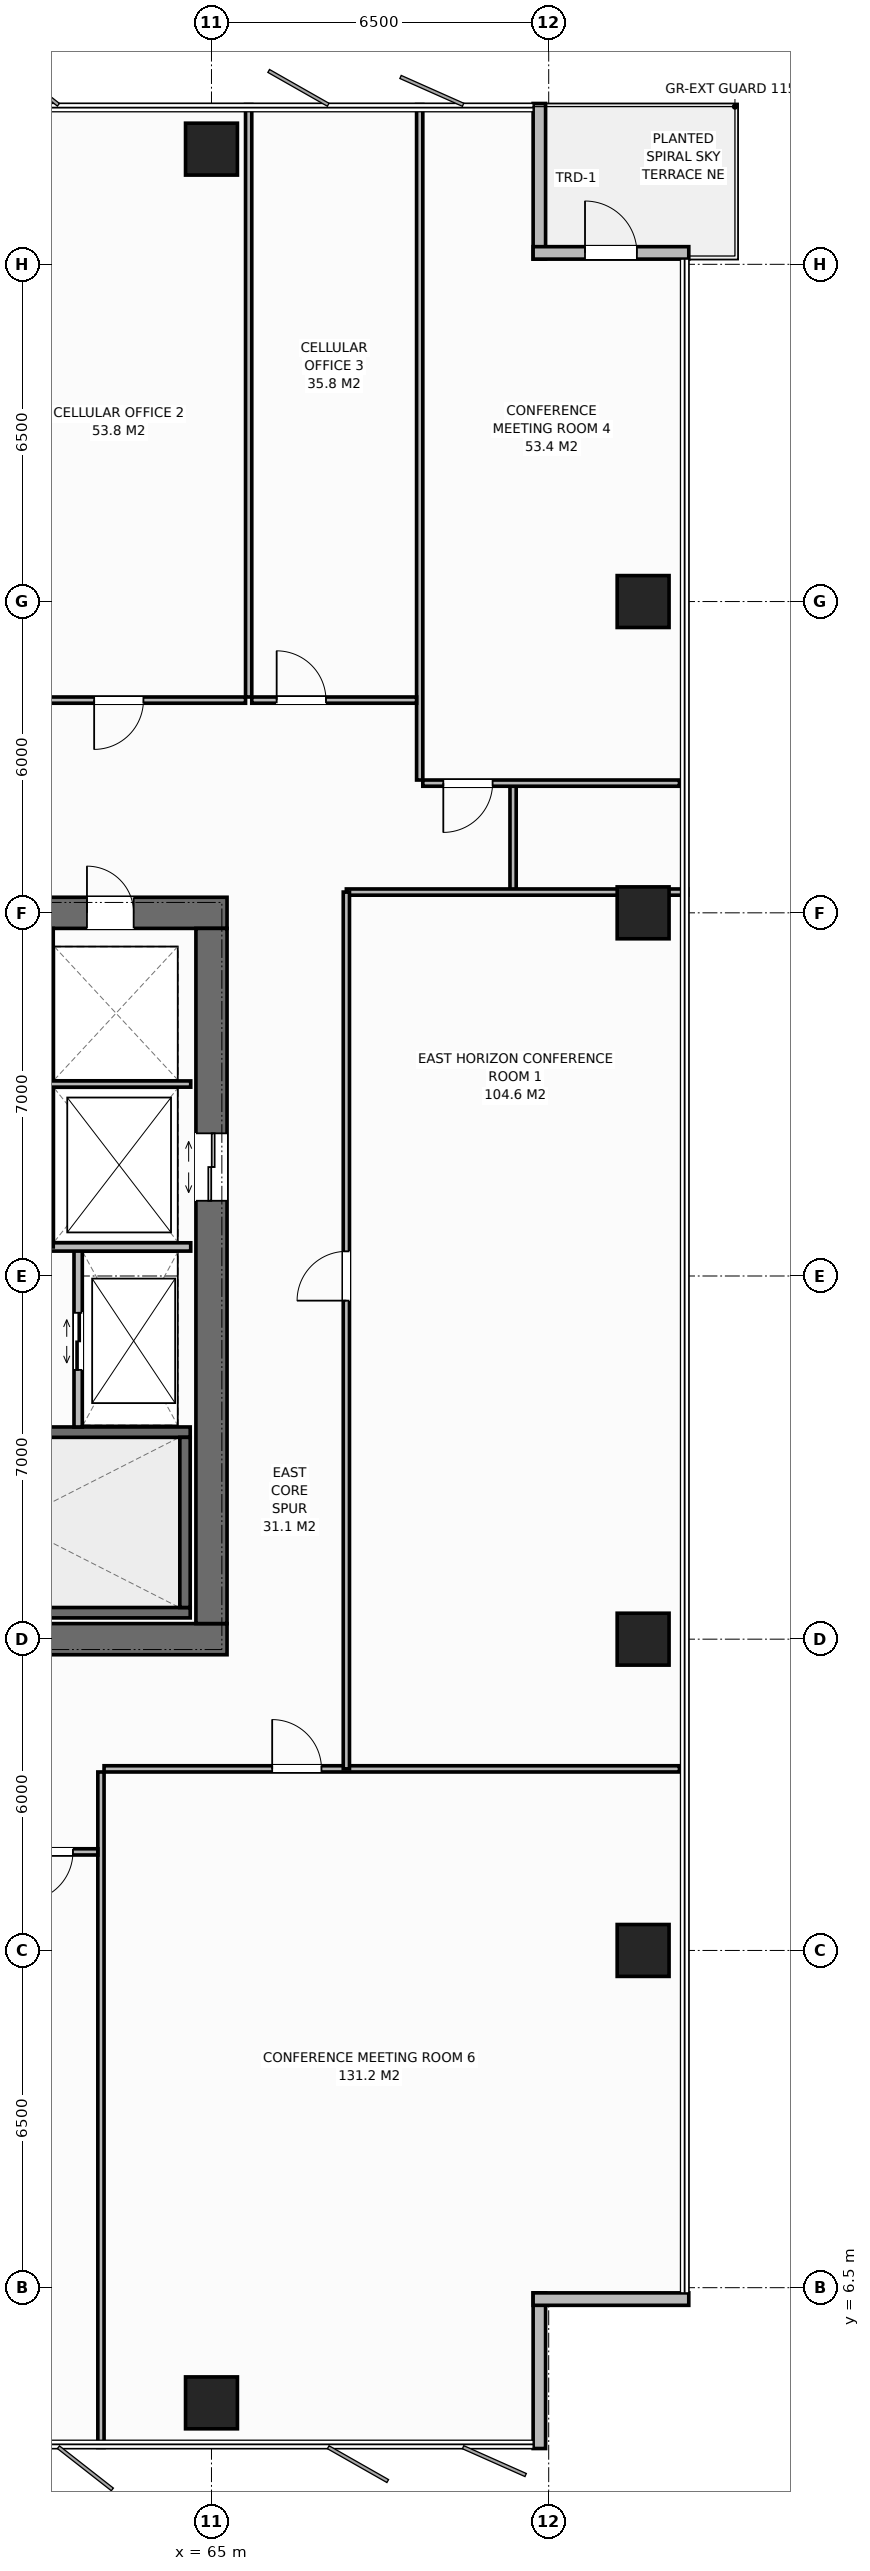
"""IFC4 building model, lengths in metres.
Left out: names, types, materials, properties, quantities, classifications, styles, units other than length and angle.
Written with IfcOpenShell. Run it as: python <this file> out.ifc"""

import sys

from ifc_helpers import new_model, si_unit, direction, frame, frame_2d, origin, origin_2d, place, context, subcontext, project, spatial, rectangle, extrude, element, fill, save


model = new_model("IFC4")
c1 = context("Model", 3, precision=1e-05, world=origin(), true_north=direction((0.0, 1.0)))
c2 = subcontext(c1, "Body", "Model", "MODEL_VIEW")
j1 = project(units=[si_unit("LENGTHUNIT", "METRE"), si_unit("PLANEANGLEUNIT", "RADIAN")], contexts=[c1])
p1 = place(None, origin())
s1 = spatial("IfcSite", under=j1, at=p1, CompositionType="ELEMENT")
p2 = place(p1, origin())
s2 = spatial("IfcBuilding", under=s1, at=p2, CompositionType="ELEMENT")
p3 = place(p2, frame((0.0, 0.0, 193.6)))
s3 = spatial("IfcBuildingStorey", under=s2, at=p3, CompositionType="ELEMENT", Elevation=193.6)
p4 = place(p3, frame((51.7, 19.0, 0.0), z_axis=(0.0, 0.0, 1.0), x_axis=(1.0, 0.0, 0.0)))
e1 = element("IfcWall", 1, at=p4, inside=s3, PredefinedType="SHEAR", context=c2, shape_type="SweptSolid", body=[
    extrude(rectangle(XDim=13.6, YDim=0.6, at=frame_2d((6.8, 0.0))), origin(), (0.0, 0.0, 1.0), 3.8),
])
p5 = place(p4, frame((3.02, 0.0, 0.0)))
e2 = element("IfcOpeningElement", 2, at=p5, cuts=e1, PredefinedType="OPENING", context=c2, shape_type="SweptSolid", body=[
    extrude(rectangle(XDim=1.4, YDim=2.2, at=frame_2d((0.7, 1.1))), frame((0.0, 0.31, 0.0), z_axis=(0.0, -1.0, 0.0), x_axis=(1.0, 0.0, 0.0)), (0.0, 0.0, 1.0), 0.62),
])
p6 = place(p3, frame((51.7, 33.0, 0.0), z_axis=(0.0, 0.0, 1.0), x_axis=(1.0, 0.0, 0.0)))
e3 = element("IfcWall", 3, at=p6, inside=s3, PredefinedType="SHEAR", context=c2, shape_type="SweptSolid", body=[
    extrude(rectangle(XDim=13.6, YDim=0.6, at=frame_2d((6.8, 0.0))), origin(), (0.0, 0.0, 1.0), 3.8),
])
p7 = place(p6, frame((3.02, 0.0, 0.0)))
e4 = element("IfcOpeningElement", 4, at=p7, cuts=e3, PredefinedType="OPENING", context=c2, shape_type="SweptSolid", body=[
    extrude(rectangle(XDim=1.4, YDim=2.2, at=frame_2d((0.7, 1.1))), frame((0.0, 0.31, 0.0), z_axis=(0.0, -1.0, 0.0), x_axis=(1.0, 0.0, 0.0)), (0.0, 0.0, 1.0), 0.62),
])
p8 = place(p6, frame((10.9, 0.0, 0.0)))
e5 = element("IfcOpeningElement", 5, at=p8, cuts=e3, PredefinedType="OPENING", context=c2, shape_type="SweptSolid", body=[
    extrude(rectangle(XDim=0.9, YDim=2.15, at=frame_2d((0.45, 1.075))), frame((0.0, 0.31, 0.0), z_axis=(0.0, -1.0, 0.0), x_axis=(1.0, 0.0, 0.0)), (0.0, 0.0, 1.0), 0.62),
])
p9 = place(p6, frame((6.3, 0.0, 0.0)))
e6 = element("IfcOpeningElement", 6, at=p9, cuts=e3, PredefinedType="OPENING", context=c2, shape_type="SweptSolid", body=[
    extrude(rectangle(XDim=0.95, YDim=2.15, at=frame_2d((0.475, 1.075))), frame((0.0, 0.31, 0.0), z_axis=(0.0, -1.0, 0.0), x_axis=(1.0, 0.0, 0.0)), (0.0, 0.0, 1.0), 0.62),
])
p10 = place(p6, frame((8.75, 0.0, 0.0)))
e7 = element("IfcOpeningElement", 7, at=p10, cuts=e3, PredefinedType="OPENING", context=c2, shape_type="SweptSolid", body=[
    extrude(rectangle(XDim=0.9, YDim=2.15, at=frame_2d((0.45, 1.075))), frame((0.0, 0.31, 0.0), z_axis=(0.0, -1.0, 0.0), x_axis=(1.0, 0.0, 0.0)), (0.0, 0.0, 1.0), 0.62),
])
p11 = place(p3, frame((65.0, 19.3, 0.0), z_axis=(0.0, 0.0, 1.0), x_axis=(0.0, 1.0, 0.0)))
e8 = element("IfcWall", 8, at=p11, inside=s3, PredefinedType="SHEAR", context=c2, shape_type="SweptSolid", body=[
    extrude(rectangle(XDim=13.4, YDim=0.6, at=frame_2d((6.7, 0.0))), origin(), (0.0, 0.0, 1.0), 3.8),
])
p12 = place(p11, frame((8.15, 0.0, 0.0)))
e9 = element("IfcOpeningElement", 9, at=p12, cuts=e8, PredefinedType="OPENING", context=c2, shape_type="SweptSolid", body=[
    extrude(rectangle(XDim=1.3, YDim=2.2, at=frame_2d((0.65, 1.1))), frame((0.0, 0.31, 0.0), z_axis=(0.0, -1.0, 0.0), x_axis=(1.0, 0.0, 0.0)), (0.0, 0.0, 1.0), 0.62),
])
p13 = place(p3, frame((56.16, 19.51, 0.0), z_axis=(0.0, 0.0, 1.0), x_axis=(1.0, 0.0, 0.0)))
e10 = element("IfcWall", 10, at=p13, inside=s3, PredefinedType="SHEAR", context=c2, shape_type="SweptSolid", body=[
    extrude(rectangle(XDim=8.43, YDim=0.2, at=frame_2d((4.215, 0.0))), origin(), (0.0, 0.0, 1.0), 3.8),
])
p14 = place(p3, frame((56.16, 22.99, 0.0), z_axis=(0.0, 0.0, 1.0), x_axis=(1.0, 0.0, 0.0)))
e11 = element("IfcWall", 11, at=p14, inside=s3, PredefinedType="SHEAR", context=c2, shape_type="SweptSolid", body=[
    extrude(rectangle(XDim=8.43, YDim=0.2, at=frame_2d((4.215, 0.0))), origin(), (0.0, 0.0, 1.0), 3.8),
])
p15 = place(p14, frame((0.45, 0.0, 0.0)))
e12 = element("IfcOpeningElement", 12, at=p15, cuts=e11, PredefinedType="OPENING", context=c2, shape_type="SweptSolid", body=[
    extrude(rectangle(XDim=1.0, YDim=2.15, at=frame_2d((0.5, 1.075))), frame((0.0, 0.11, 0.0), z_axis=(0.0, -1.0, 0.0), x_axis=(1.0, 0.0, 0.0)), (0.0, 0.0, 1.0), 0.22),
])
p16 = place(p3, frame((64.49, 19.61, 0.0), z_axis=(0.0, 0.0, 1.0), x_axis=(0.0, 1.0, 0.0)))
e13 = element("IfcWall", 13, at=p16, inside=s3, PredefinedType="SHEAR", context=c2, shape_type="SweptSolid", body=[
    extrude(rectangle(XDim=3.28, YDim=0.2, at=frame_2d((1.64, 0.0))), origin(), (0.0, 0.0, 1.0), 3.8),
])
for number, where, z_axis, x_axis in (
    (14, (65.0, 4.28, 0.0), (0.0, 0.0, 1.0), (1.0, 0.0, 0.0)),
    (15, (65.0, 47.72, 0.0), (0.0, 0.0, 1.0), (1.0, 0.0, 0.0)),
    (16, (73.32, 13.0, 0.0), (0.0, 0.0, 1.0), (1.0, 0.0, 0.0)),
    (17, (73.32, 19.0, 0.0), (0.0, 0.0, 1.0), (1.0, 0.0, 0.0)),
    (18, (73.32, 33.0, 0.0), (0.0, 0.0, 1.0), (1.0, 0.0, 0.0)),
    (19, (73.32, 39.0, 0.0), (0.0, 0.0, 1.0), (1.0, 0.0, 0.0)),
):
    element("IfcColumn", number, at=place(p3, frame(where, z_axis=z_axis, x_axis=x_axis)), inside=s3, PredefinedType="COLUMN", context=c2, shape_type="SweptSolid", body=[
        extrude(rectangle(XDim=1.0, YDim=1.0, at=origin_2d()), origin(), (0.0, 0.0, 1.0), 3.8),
    ])
p17 = place(p3, frame((71.32, 48.6, 0.0), z_axis=(0.0, 0.0, 1.0), x_axis=(0.0, -1.0, 0.0)))
e20 = element("IfcWall", 20, at=p17, inside=s3, PredefinedType="STANDARD", context=c2, shape_type="SweptSolid", body=[
    extrude(rectangle(XDim=3.0, YDim=0.24, at=frame_2d((1.5, 0.0))), origin(), (0.0, 0.0, 1.0), 3.52),
])
p18 = place(p3, frame((71.2, 45.72, 0.0), z_axis=(0.0, 0.0, 1.0), x_axis=(1.0, 0.0, 0.0)))
e21 = element("IfcWall", 21, at=p18, inside=s3, PredefinedType="STANDARD", context=c2, shape_type="SweptSolid", body=[
    extrude(rectangle(XDim=3.0, YDim=0.24, at=frame_2d((1.5, 0.0))), origin(), (0.0, 0.0, 1.0), 3.52),
])
p19 = place(p18, frame((1.0, 0.0, 0.0)))
e22 = element("IfcOpeningElement", 22, at=p19, cuts=e21, PredefinedType="OPENING", context=c2, shape_type="SweptSolid", body=[
    extrude(rectangle(XDim=1.0, YDim=2.2, at=frame_2d((0.5, 1.1))), frame((0.0, 0.13, 0.0), z_axis=(0.0, -1.0, 0.0), x_axis=(1.0, 0.0, 0.0)), (0.0, 0.0, 1.0), 0.26),
])
for number, where, z_axis, x_axis in (
    (23, (71.32, 6.4, 0.0), (0.0, 0.0, 1.0), (0.0, -1.0, 0.0)),
    (24, (74.2, 6.28, 0.0), (0.0, 0.0, 1.0), (-1.0, 0.0, 0.0)),
):
    element("IfcWall", number, at=place(p3, frame(where, z_axis=z_axis, x_axis=x_axis)), inside=s3, PredefinedType="STANDARD", context=c2, shape_type="SweptSolid", body=[
        extrude(rectangle(XDim=3.0, YDim=0.24, at=frame_2d((1.5, 0.0))), origin(), (0.0, 0.0, 1.0), 3.52),
    ])
p20 = place(p3, frame((62.43, 23.09, 0.0), z_axis=(0.0, 0.0, 1.0), x_axis=(0.0, 1.0, 0.0)))
e25 = element("IfcWall", 25, at=p20, inside=s3, PredefinedType="STANDARD", context=c2, shape_type="SweptSolid", body=[
    extrude(rectangle(XDim=3.47, YDim=0.16, at=frame_2d((1.735, 0.0))), origin(), (0.0, 0.0, 1.0), 3.52),
])
p21 = place(p20, frame((1.1, 0.0, 0.0)))
e26 = element("IfcOpeningElement", 26, at=p21, cuts=e25, PredefinedType="OPENING", context=c2, shape_type="SweptSolid", body=[
    extrude(rectangle(XDim=1.1, YDim=2.2, at=frame_2d((0.55, 1.1))), frame((0.0, 0.09, 0.0), z_axis=(0.0, -1.0, 0.0), x_axis=(1.0, 0.0, 0.0)), (0.0, 0.0, 1.0), 0.18),
])
p22 = place(p3, frame((56.26, 26.56, 0.0), z_axis=(0.0, 0.0, 1.0), x_axis=(1.0, 0.0, 0.0)))
e27 = element("IfcWall", 27, at=p22, inside=s3, PredefinedType="STANDARD", context=c2, shape_type="SweptSolid", body=[
    extrude(rectangle(XDim=8.34, YDim=0.16, at=frame_2d((4.17, 0.0))), origin(), (0.0, 0.0, 1.0), 3.52),
])
p23 = place(p3, frame((61.87, 26.56, 0.0), z_axis=(0.0, 0.0, 1.0), x_axis=(0.0, 1.0, 0.0)))
e28 = element("IfcWall", 28, at=p23, inside=s3, PredefinedType="STANDARD", context=c2, shape_type="SweptSolid", body=[
    extrude(rectangle(XDim=6.14, YDim=0.16, at=frame_2d((3.07, 0.0))), origin(), (0.0, 0.0, 1.0), 3.52),
])
p24 = place(p3, frame((61.87, 29.7, 0.0), z_axis=(0.0, 0.0, 1.0), x_axis=(1.0, 0.0, 0.0)))
e29 = element("IfcWall", 29, at=p24, inside=s3, PredefinedType="PARTITIONING", context=c2, shape_type="SweptSolid", body=[
    extrude(rectangle(XDim=2.73, YDim=0.12, at=frame_2d((1.365, 0.0))), origin(), (0.0, 0.0, 1.0), 3.52),
])
p25 = place(p3, frame((70.813, 33.4, 0.0), z_axis=(0.0, 0.0, 1.0), x_axis=(0.0, 1.0, 0.0)))
e30 = element("IfcWall", 30, at=p25, inside=s3, PredefinedType="PARTITIONING", context=c2, shape_type="SweptSolid", body=[
    extrude(rectangle(XDim=2.1, YDim=0.12, at=frame_2d((1.05, 0.0))), origin(), (0.0, 0.0, 1.0), 3.52),
])
p26 = place(p3, frame((65.717, 37.16, 0.0), z_axis=(0.0, 0.0, 1.0), x_axis=(0.0, 1.0, 0.0)))
e31 = element("IfcWall", 31, at=p26, inside=s3, PredefinedType="PARTITIONING", context=c2, shape_type="SweptSolid", body=[
    extrude(rectangle(XDim=11.42, YDim=0.12, at=frame_2d((5.71, 0.0))), origin(), (0.0, 0.0, 1.0), 3.52),
])
p27 = place(p3, frame((60.77, 37.1, 0.0), z_axis=(0.0, 0.0, 1.0), x_axis=(1.0, 0.0, 0.0)))
e32 = element("IfcWall", 32, at=p27, inside=s3, PredefinedType="PARTITIONING", context=c2, shape_type="SweptSolid", body=[
    extrude(rectangle(XDim=4.886, YDim=0.12, at=frame_2d((2.443, 0.0))), origin(), (0.0, 0.0, 1.0), 3.52),
])
p28 = place(p27, frame((1.968, 0.0, 0.0)))
e33 = element("IfcOpeningElement", 33, at=p28, cuts=e32, PredefinedType="OPENING", context=c2, shape_type="SweptSolid", body=[
    extrude(rectangle(XDim=0.95, YDim=2.15, at=frame_2d((0.475, 1.075))), frame((0.0, 0.07, 0.0), z_axis=(0.0, -1.0, 0.0), x_axis=(1.0, 0.0, 0.0)), (0.0, 0.0, 1.0), 0.14),
])
p29 = place(p3, frame((69.013, 35.56, 0.0), z_axis=(0.0, 0.0, 1.0), x_axis=(0.0, 1.0, 0.0)))
e34 = element("IfcWall", 34, at=p29, inside=s3, PredefinedType="PARTITIONING", context=c2, shape_type="SweptSolid", body=[
    extrude(rectangle(XDim=13.02, YDim=0.12, at=frame_2d((6.51, 0.0))), origin(), (0.0, 0.0, 1.0), 3.52),
])
p30 = place(p3, frame((65.777, 37.1, 0.0), z_axis=(0.0, 0.0, 1.0), x_axis=(1.0, 0.0, 0.0)))
e35 = element("IfcWall", 35, at=p30, inside=s3, PredefinedType="PARTITIONING", context=c2, shape_type="SweptSolid", body=[
    extrude(rectangle(XDim=3.177, YDim=0.12, at=frame_2d((1.588, 0.0))), origin(), (0.0, 0.0, 1.0), 3.52),
])
p31 = place(p30, frame((0.48, 0.0, 0.0)))
e36 = element("IfcOpeningElement", 36, at=p31, cuts=e35, PredefinedType="OPENING", context=c2, shape_type="SweptSolid", body=[
    extrude(rectangle(XDim=0.95, YDim=2.15, at=frame_2d((0.475, 1.075))), frame((0.0, 0.07, 0.0), z_axis=(0.0, -1.0, 0.0), x_axis=(1.0, 0.0, 0.0)), (0.0, 0.0, 1.0), 0.14),
])
p32 = place(p3, frame((69.073, 35.5, 0.0), z_axis=(0.0, 0.0, 1.0), x_axis=(1.0, 0.0, 0.0)))
e37 = element("IfcWall", 37, at=p32, inside=s3, PredefinedType="PARTITIONING", context=c2, shape_type="SweptSolid", body=[
    extrude(rectangle(XDim=4.947, YDim=0.12, at=frame_2d((2.473, 0.0))), origin(), (0.0, 0.0, 1.0), 3.52),
])
p33 = place(p32, frame((0.395, 0.0, 0.0)))
e38 = element("IfcOpeningElement", 38, at=p33, cuts=e37, PredefinedType="OPENING", context=c2, shape_type="SweptSolid", body=[
    extrude(rectangle(XDim=0.95, YDim=2.15, at=frame_2d((0.475, 1.075))), frame((0.0, 0.07, 0.0), z_axis=(0.0, -1.0, 0.0), x_axis=(1.0, 0.0, 0.0)), (0.0, 0.0, 1.0), 0.14),
])
p34 = place(p3, frame((62.87, 3.42, 0.0), z_axis=(0.0, 0.0, 1.0), x_axis=(0.0, 1.0, 0.0)))
e39 = element("IfcWall", 39, at=p34, inside=s3, PredefinedType="PARTITIONING", context=c2, shape_type="SweptSolid", body=[
    extrude(rectangle(XDim=13.02, YDim=0.12, at=frame_2d((6.51, 0.0))), origin(), (0.0, 0.0, 1.0), 3.52),
])
p35 = place(p3, frame((56.255, 14.9, 0.0), z_axis=(0.0, 0.0, 1.0), x_axis=(1.0, 0.0, 0.0)))
e40 = element("IfcWall", 40, at=p35, inside=s3, PredefinedType="PARTITIONING", context=c2, shape_type="SweptSolid", body=[
    extrude(rectangle(XDim=6.555, YDim=0.12, at=frame_2d((3.277, 0.0))), origin(), (0.0, 0.0, 1.0), 3.52),
])
p36 = place(p35, frame((5.125, 0.0, 0.0)))
e41 = element("IfcOpeningElement", 41, at=p36, cuts=e40, PredefinedType="OPENING", context=c2, shape_type="SweptSolid", body=[
    extrude(rectangle(XDim=0.95, YDim=2.15, at=frame_2d((0.475, 1.075))), frame((0.0, 0.07, 0.0), z_axis=(0.0, -1.0, 0.0), x_axis=(1.0, 0.0, 0.0)), (0.0, 0.0, 1.0), 0.14),
])
p37 = place(p3, frame((62.93, 16.5, 0.0), z_axis=(0.0, 0.0, 1.0), x_axis=(1.0, 0.0, 0.0)))
e42 = element("IfcWall", 42, at=p37, inside=s3, PredefinedType="PARTITIONING", context=c2, shape_type="SweptSolid", body=[
    extrude(rectangle(XDim=11.09, YDim=0.12, at=frame_2d((5.545, 0.0))), origin(), (0.0, 0.0, 1.0), 3.52),
])
p38 = place(p37, frame((3.24, 0.0, 0.0)))
e43 = element("IfcOpeningElement", 43, at=p38, cuts=e42, PredefinedType="OPENING", context=c2, shape_type="SweptSolid", body=[
    extrude(rectangle(XDim=0.95, YDim=2.15, at=frame_2d((0.475, 1.075))), frame((0.0, 0.07, 0.0), z_axis=(0.0, -1.0, 0.0), x_axis=(1.0, 0.0, 0.0)), (0.0, 0.0, 1.0), 0.14),
])
p39 = place(p3, frame((67.6, 33.4, 0.0), z_axis=(0.0, 0.0, 1.0), x_axis=(1.0, 0.0, 0.0)))
e44 = element("IfcWall", 44, at=p39, inside=s3, PredefinedType="PARTITIONING", context=c2, shape_type="SweptSolid", body=[
    extrude(rectangle(XDim=6.58, YDim=0.12, at=frame_2d((3.29, 0.0))), origin(), (0.0, 0.0, 1.0), 3.52),
])
p40 = place(p3, frame((67.6, 16.5, 0.0), z_axis=(0.0, 0.0, 1.0), x_axis=(0.0, 1.0, 0.0)))
e45 = element("IfcWall", 45, at=p40, inside=s3, PredefinedType="PARTITIONING", context=c2, shape_type="SweptSolid", body=[
    extrude(rectangle(XDim=16.9, YDim=0.12, at=frame_2d((8.45, 0.0))), origin(), (0.0, 0.0, 1.0), 3.52),
])
p41 = place(p40, frame((9.025, 0.0, 0.0)))
e46 = element("IfcOpeningElement", 46, at=p41, cuts=e45, PredefinedType="OPENING", context=c2, shape_type="SweptSolid", body=[
    extrude(rectangle(XDim=0.95, YDim=2.15, at=frame_2d((0.475, 1.075))), frame((0.0, 0.07, 0.0), z_axis=(0.0, -1.0, 0.0), x_axis=(1.0, 0.0, 0.0)), (0.0, 0.0, 1.0), 0.14),
])
p42 = place(p19, origin())
e47 = element("IfcDoor", 47, at=p42, inside=s3, OperationType="SINGLE_SWING_LEFT", PredefinedType="DOOR", context=c2, shape_type="SweptSolid", body=[
    extrude(rectangle(XDim=1.0, YDim=2.2, at=frame_2d((0.5, 1.1))), frame((0.0, 0.025, 0.0), z_axis=(0.0, -1.0, 0.0), x_axis=(1.0, 0.0, 0.0)), (0.0, 0.0, 1.0), 0.05),
])
fill(e22, e47)
p43 = place(p21, origin())
e48 = element("IfcDoor", 48, at=p43, inside=s3, OperationType="DOUBLE_DOOR_SLIDING", PredefinedType="DOOR", context=c2, shape_type="SweptSolid", body=[
    extrude(rectangle(XDim=1.1, YDim=2.2, at=frame_2d((0.55, 1.1))), frame((0.0, 0.025, 0.0), z_axis=(0.0, -1.0, 0.0), x_axis=(1.0, 0.0, 0.0)), (0.0, 0.0, 1.0), 0.05),
])
fill(e26, e48)
p44 = place(p12, origin())
e49 = element("IfcDoor", 49, at=p44, inside=s3, OperationType="DOUBLE_DOOR_SLIDING", PredefinedType="DOOR", context=c2, shape_type="SweptSolid", body=[
    extrude(rectangle(XDim=1.3, YDim=2.2, at=frame_2d((0.65, 1.1))), frame((0.0, 0.025, 0.0), z_axis=(0.0, -1.0, 0.0), x_axis=(1.0, 0.0, 0.0)), (0.0, 0.0, 1.0), 0.05),
])
fill(e9, e49)
p45 = place(p8, origin())
e50 = element("IfcDoor", 50, at=p45, inside=s3, OperationType="SINGLE_SWING_LEFT", PredefinedType="DOOR", context=c2, shape_type="SweptSolid", body=[
    extrude(rectangle(XDim=0.9, YDim=2.15, at=frame_2d((0.45, 1.075))), frame((0.0, -0.025, 0.0), z_axis=(0.0, -1.0, 0.0), x_axis=(1.0, 0.0, 0.0)), (0.0, 0.0, 1.0), 0.05),
])
fill(e5, e50)
p46 = place(p28, origin())
e51 = element("IfcDoor", 51, at=p46, inside=s3, OperationType="SINGLE_SWING_RIGHT", PredefinedType="DOOR", context=c2, shape_type="SweptSolid", body=[
    extrude(rectangle(XDim=0.95, YDim=2.15, at=frame_2d((0.475, 1.075))), frame((0.0, 0.025, 0.0), z_axis=(0.0, -1.0, 0.0), x_axis=(1.0, 0.0, 0.0)), (0.0, 0.0, 1.0), 0.05),
])
fill(e33, e51)
p47 = place(p31, origin())
e52 = element("IfcDoor", 52, at=p47, inside=s3, OperationType="SINGLE_SWING_LEFT", PredefinedType="DOOR", context=c2, shape_type="SweptSolid", body=[
    extrude(rectangle(XDim=0.95, YDim=2.15, at=frame_2d((0.475, 1.075))), frame((0.0, 0.025, 0.0), z_axis=(0.0, -1.0, 0.0), x_axis=(1.0, 0.0, 0.0)), (0.0, 0.0, 1.0), 0.05),
])
fill(e36, e52)
p48 = place(p33, origin())
e53 = element("IfcDoor", 53, at=p48, inside=s3, OperationType="SINGLE_SWING_RIGHT", PredefinedType="DOOR", context=c2, shape_type="SweptSolid", body=[
    extrude(rectangle(XDim=0.95, YDim=2.15, at=frame_2d((0.475, 1.075))), frame((0.0, 0.025, 0.0), z_axis=(0.0, -1.0, 0.0), x_axis=(1.0, 0.0, 0.0)), (0.0, 0.0, 1.0), 0.05),
])
fill(e38, e53)
p49 = place(p36, origin())
e54 = element("IfcDoor", 54, at=p49, inside=s3, OperationType="SINGLE_SWING_RIGHT", PredefinedType="DOOR", context=c2, shape_type="SweptSolid", body=[
    extrude(rectangle(XDim=0.95, YDim=2.15, at=frame_2d((0.475, 1.075))), frame((0.0, 0.025, 0.0), z_axis=(0.0, -1.0, 0.0), x_axis=(1.0, 0.0, 0.0)), (0.0, 0.0, 1.0), 0.05),
])
fill(e41, e54)
p50 = place(p38, origin())
e55 = element("IfcDoor", 55, at=p50, inside=s3, OperationType="SINGLE_SWING_LEFT", PredefinedType="DOOR", context=c2, shape_type="SweptSolid", body=[
    extrude(rectangle(XDim=0.95, YDim=2.15, at=frame_2d((0.475, 1.075))), frame((0.0, 0.025, 0.0), z_axis=(0.0, -1.0, 0.0), x_axis=(1.0, 0.0, 0.0)), (0.0, 0.0, 1.0), 0.05),
])
fill(e43, e55)
p51 = place(p41, origin())
e56 = element("IfcDoor", 56, at=p51, inside=s3, OperationType="SINGLE_SWING_LEFT", PredefinedType="DOOR", context=c2, shape_type="SweptSolid", body=[
    extrude(rectangle(XDim=0.95, YDim=2.15, at=frame_2d((0.475, 1.075))), frame((0.0, 0.025, 0.0), z_axis=(0.0, -1.0, 0.0), x_axis=(1.0, 0.0, 0.0)), (0.0, 0.0, 1.0), 0.05),
])
fill(e46, e56)
save(model, sys.argv[1])
